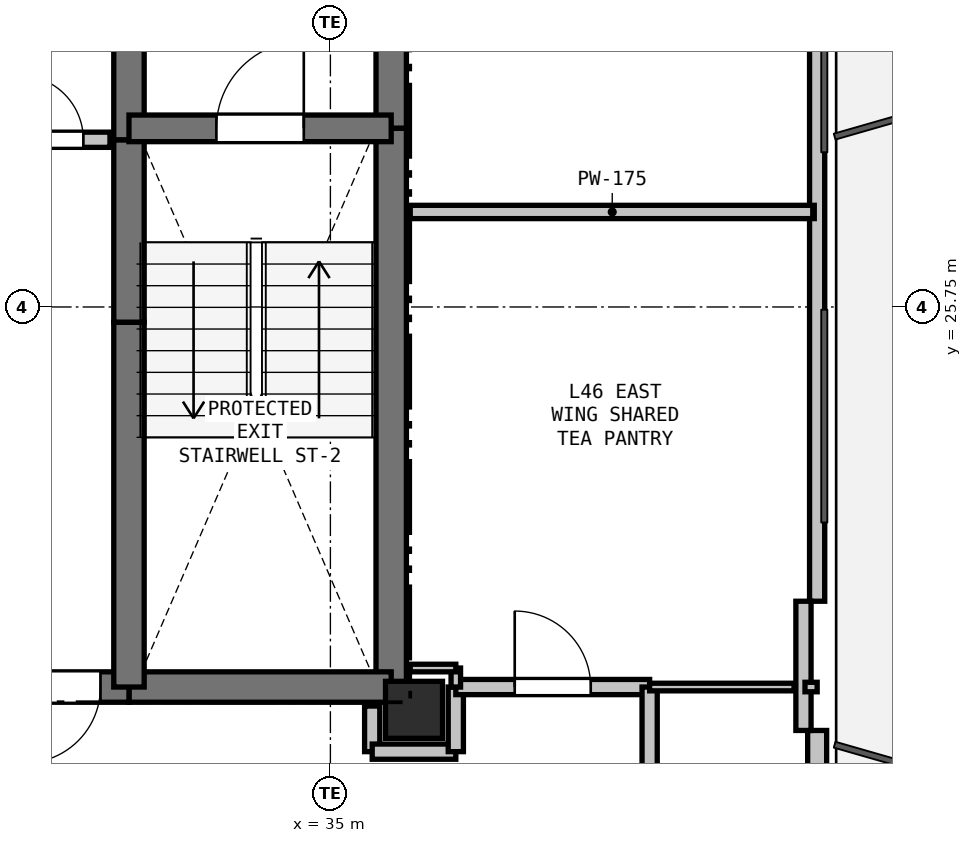
"""IFC4 building model, lengths in metres.
Left out: names, types, materials, properties, quantities, classifications, styles, units other than length and angle.
Written with IfcOpenShell. Run it as: python <this file> out.ifc"""

import sys

from ifc_helpers import new_model, si_unit, direction, frame, frame_2d, origin, origin_2d, place, context, subcontext, project, spatial, rectangle, extrude, element, fill, save


model = new_model("IFC4")
c1 = context("Model", 3, precision=1e-05, world=origin(), true_north=direction((0.0, 1.0)))
c2 = subcontext(c1, "Body", "Model", "MODEL_VIEW")
j1 = project(units=[si_unit("LENGTHUNIT", "METRE"), si_unit("PLANEANGLEUNIT", "RADIAN")], contexts=[c1])
p1 = place(None, origin())
s1 = spatial("IfcSite", under=j1, at=p1, CompositionType="ELEMENT")
p2 = place(p1, origin())
s2 = spatial("IfcBuilding", under=s1, at=p2, CompositionType="ELEMENT")
p3 = place(p2, frame((0.0, 0.0, 167.4)))
s3 = spatial("IfcBuildingStorey", under=s2, at=p3, CompositionType="ELEMENT", Elevation=167.4)
p4 = place(p3, frame((36.1, 20.45, 0.0), z_axis=(0.0, 0.0, 1.0), x_axis=(1.0, 0.0, 0.0)))
e1 = element("IfcColumn", 1, at=p4, inside=s3, PredefinedType="COLUMN", context=c2, shape_type="SweptSolid", body=[
    extrude(rectangle(XDim=0.75, YDim=0.75, at=origin_2d()), origin(), (0.0, 0.0, 1.0), 3.3),
])
p5 = place(p3, frame((41.404, 31.621, 0.0), z_axis=(0.0, 0.0, 1.0), x_axis=(0.0, -1.0, 0.0)))
e2 = element("IfcWall", 2, at=p5, inside=s3, PredefinedType="PARAPET", context=c2, shape_type="SweptSolid", body=[
    extrude(rectangle(XDim=9.742, YDim=0.2, at=frame_2d((4.871, 0.0))), origin(), (0.0, 0.0, 1.0), 0.2),
])
p6 = place(p3, frame((41.404, 20.179, 0.0), z_axis=(0.0, 0.0, 1.0), x_axis=(0.0, -1.0, 0.0)))
e3 = element("IfcWall", 3, at=p6, inside=s3, PredefinedType="SOLIDWALL", context=c2, shape_type="SweptSolid", body=[
    extrude(rectangle(XDim=10.442, YDim=0.25, at=frame_2d((5.221, 0.0))), origin(), (0.0, 0.0, 1.0), 2.64),
])
p7 = place(p6, frame((2.672, 0.0, 0.9)))
e4 = element("IfcOpeningElement", 4, at=p7, cuts=e3, PredefinedType="OPENING", context=c2, shape_type="SweptSolid", body=[
    extrude(rectangle(XDim=0.9, YDim=1.4, at=frame_2d((0.45, 0.7))), frame((0.0, 0.135, 0.0), z_axis=(0.0, -1.0, 0.0), x_axis=(1.0, 0.0, 0.0)), (0.0, 0.0, 1.0), 0.27),
])
p8 = place(p3, frame((41.224, 21.879, 0.0), z_axis=(0.0, 0.0, 1.0), x_axis=(0.0, -1.0, 0.0)))
e5 = element("IfcWall", 5, at=p8, inside=s3, PredefinedType="PARAPET", context=c2, shape_type="SweptSolid", body=[
    extrude(rectangle(XDim=1.7, YDim=0.2, at=frame_2d((0.85, 0.0))), origin(), (0.0, 0.0, 1.0), 2.64),
])
p9 = place(p3, frame((35.8, 32.75, 0.0), z_axis=(0.0, 0.0, 1.0), x_axis=(0.0, -1.0, 0.0)))
e6 = element("IfcWall", 6, at=p9, inside=s3, PredefinedType="SHEAR", context=c2, shape_type="SweptSolid", body=[
    extrude(rectangle(XDim=4.65, YDim=0.4, at=frame_2d((2.325, 0.0))), origin(), (0.0, 0.0, 1.0), 3.02),
])
p10 = place(p3, frame((35.8, 28.1, 0.0), z_axis=(0.0, 0.0, 1.0), x_axis=(0.0, -1.0, 0.0)))
e7 = element("IfcWall", 7, at=p10, inside=s3, PredefinedType="SHEAR", context=c2, shape_type="SweptSolid", body=[
    extrude(rectangle(XDim=7.35, YDim=0.4, at=frame_2d((3.675, 0.0))), origin(), (0.0, 0.0, 1.0), 3.02),
])
p11 = place(p3, frame((35.8, 20.75, 0.0), z_axis=(0.0, 0.0, 1.0), x_axis=(-1.0, 0.0, 0.0)))
e8 = element("IfcWall", 8, at=p11, inside=s3, PredefinedType="SHEAR", context=c2, shape_type="SweptSolid", body=[
    extrude(rectangle(XDim=3.45, YDim=0.4, at=frame_2d((1.725, 0.0))), origin(), (0.0, 0.0, 1.0), 3.02),
])
p12 = place(p3, frame((32.35, 20.75, 0.0), z_axis=(0.0, 0.0, 1.0), x_axis=(-1.0, 0.0, 0.0)))
e9 = element("IfcWall", 9, at=p12, inside=s3, PredefinedType="SHEAR", context=c2, shape_type="SweptSolid", body=[
    extrude(rectangle(XDim=1.75, YDim=0.4, at=frame_2d((0.875, 0.0))), origin(), (0.0, 0.0, 1.0), 3.02),
])
p13 = place(p12, frame((0.375, 0.0, 0.0)))
e10 = element("IfcOpeningElement", 10, at=p13, cuts=e9, PredefinedType="OPENING", context=c2, shape_type="SweptSolid", body=[
    extrude(rectangle(XDim=1.0, YDim=2.15, at=frame_2d((0.5, 1.075))), frame((0.0, 0.21, 0.0), z_axis=(0.0, -1.0, 0.0), x_axis=(1.0, 0.0, 0.0)), (0.0, 0.0, 1.0), 0.42),
])
p14 = place(p3, frame((32.35, 20.75, 0.0), z_axis=(0.0, 0.0, 1.0), x_axis=(0.0, 1.0, 0.0)))
e11 = element("IfcWall", 11, at=p14, inside=s3, PredefinedType="SHEAR", context=c2, shape_type="SweptSolid", body=[
    extrude(rectangle(XDim=4.8, YDim=0.4, at=frame_2d((2.4, 0.0))), origin(), (0.0, 0.0, 1.0), 3.02),
])
p15 = place(p3, frame((32.35, 25.55, 0.0), z_axis=(0.0, 0.0, 1.0), x_axis=(0.0, 1.0, 0.0)))
e12 = element("IfcWall", 12, at=p15, inside=s3, PredefinedType="SHEAR", context=c2, shape_type="SweptSolid", body=[
    extrude(rectangle(XDim=2.4, YDim=0.4, at=frame_2d((1.2, 0.0))), origin(), (0.0, 0.0, 1.0), 3.02),
])
p16 = place(p3, frame((32.35, 27.95, 0.0), z_axis=(0.0, 0.0, 1.0), x_axis=(0.0, 1.0, 0.0)))
e13 = element("IfcWall", 13, at=p16, inside=s3, PredefinedType="SHEAR", context=c2, shape_type="SweptSolid", body=[
    extrude(rectangle(XDim=2.8, YDim=0.4, at=frame_2d((1.4, 0.0))), origin(), (0.0, 0.0, 1.0), 3.02),
])
p17 = place(p3, frame((32.35, 28.1, 0.0), z_axis=(0.0, 0.0, 1.0), x_axis=(1.0, 0.0, 0.0)))
e14 = element("IfcWall", 14, at=p17, inside=s3, PredefinedType="SHEAR", context=c2, shape_type="SweptSolid", body=[
    extrude(rectangle(XDim=3.45, YDim=0.35, at=frame_2d((1.725, 0.0))), origin(), (0.0, 0.0, 1.0), 3.02),
])
p18 = place(p17, frame((1.15, 0.0, 0.0)))
e15 = element("IfcOpeningElement", 15, at=p18, cuts=e14, PredefinedType="OPENING", context=c2, shape_type="SweptSolid", body=[
    extrude(rectangle(XDim=1.15, YDim=2.15, at=frame_2d((0.575, 1.075))), frame((0.0, 0.185, 0.0), z_axis=(0.0, -1.0, 0.0), x_axis=(1.0, 0.0, 0.0)), (0.0, 0.0, 1.0), 0.37),
])
p19 = place(p3, frame((30.55, 27.95, 0.0), z_axis=(0.0, 0.0, 1.0), x_axis=(1.0, 0.0, 0.0)))
e16 = element("IfcWall", 16, at=p19, inside=s3, PredefinedType="PARTITIONING", context=c2, shape_type="SweptSolid", body=[
    extrude(rectangle(XDim=1.55, YDim=0.2, at=frame_2d((0.775, 0.0))), origin(), (0.0, 0.0, 1.0), 3.02),
])
p20 = place(p19, frame((0.35, 0.0, 0.0)))
e17 = element("IfcOpeningElement", 17, at=p20, cuts=e16, PredefinedType="OPENING", context=c2, shape_type="SweptSolid", body=[
    extrude(rectangle(XDim=0.85, YDim=2.1, at=frame_2d((0.425, 1.05))), frame((0.0, 0.11, 0.0), z_axis=(0.0, -1.0, 0.0), x_axis=(1.0, 0.0, 0.0)), (0.0, 0.0, 1.0), 0.22),
])
p21 = place(p3, frame((35.55, 20.5, 0.0), z_axis=(0.0, 0.0, 1.0), x_axis=(0.0, -1.0, 0.0)))
e18 = element("IfcWall", 18, at=p21, inside=s3, PredefinedType="PARTITIONING", context=c2, shape_type="SweptSolid", body=[
    extrude(rectangle(XDim=0.6, YDim=0.2, at=frame_2d((0.3, 0.0))), origin(), (0.0, 0.0, 1.0), 2.545),
])
p22 = place(p3, frame((35.55, 19.9, 0.0), z_axis=(0.0, 0.0, 1.0), x_axis=(1.0, 0.0, 0.0)))
e19 = element("IfcWall", 19, at=p22, inside=s3, PredefinedType="PARTITIONING", context=c2, shape_type="SweptSolid", body=[
    extrude(rectangle(XDim=1.1, YDim=0.2, at=frame_2d((0.55, 0.0))), origin(), (0.0, 0.0, 1.0), 2.469),
])
p23 = place(p3, frame((36.65, 19.9, 0.0), z_axis=(0.0, 0.0, 1.0), x_axis=(0.0, 1.0, 0.0)))
e20 = element("IfcWall", 20, at=p23, inside=s3, PredefinedType="PARTITIONING", context=c2, shape_type="SweptSolid", body=[
    extrude(rectangle(XDim=0.85, YDim=0.2, at=frame_2d((0.425, 0.0))), origin(), (0.0, 0.0, 1.0), 3.02),
])
p24 = place(p3, frame((36.65, 20.75, 0.0), z_axis=(0.0, 0.0, 1.0), x_axis=(1.0, 0.0, 0.0)))
e21 = element("IfcWall", 21, at=p24, inside=s3, PredefinedType="PARTITIONING", context=c2, shape_type="SweptSolid", body=[
    extrude(rectangle(XDim=2.55, YDim=0.2, at=frame_2d((1.275, 0.0))), origin(), (0.0, 0.0, 1.0), 3.02),
])
p25 = place(p24, frame((0.775, 0.0, 0.0)))
e22 = element("IfcOpeningElement", 22, at=p25, cuts=e21, PredefinedType="OPENING", context=c2, shape_type="SweptSolid", body=[
    extrude(rectangle(XDim=1.0, YDim=2.15, at=frame_2d((0.5, 1.075))), frame((0.0, 0.11, 0.0), z_axis=(0.0, -1.0, 0.0), x_axis=(1.0, 0.0, 0.0)), (0.0, 0.0, 1.0), 0.22),
])
p26 = place(p3, frame((39.2, 20.75, 0.0), z_axis=(0.0, 0.0, 1.0), x_axis=(0.0, -1.0, 0.0)))
e23 = element("IfcWall", 23, at=p26, inside=s3, PredefinedType="PARTITIONING", context=c2, shape_type="SweptSolid", body=[
    extrude(rectangle(XDim=2.6, YDim=0.2, at=frame_2d((1.3, 0.0))), origin(), (0.0, 0.0, 1.0), 3.02),
])
p27 = place(p3, frame((41.366, 27.0, 0.0), z_axis=(0.0, 0.0, 1.0), x_axis=(-1.0, 0.0, 0.0)))
e24 = element("IfcWall", 24, at=p27, inside=s3, PredefinedType="PLUMBINGWALL", context=c2, shape_type="SweptSolid", body=[
    extrude(rectangle(XDim=5.316, YDim=0.175, at=frame_2d((2.658, 0.0))), origin(), (0.0, 0.0, 1.0), 2.365),
])
p28 = place(p3, frame((41.404, 20.75, 0.0), z_axis=(0.0, 0.0, 1.0), x_axis=(-1.0, 0.0, 0.0)))
e25 = element("IfcWall", 25, at=p28, inside=s3, PredefinedType="PARTITIONING", context=c2, shape_type="SweptSolid", body=[
    extrude(rectangle(XDim=0.16, YDim=0.125, at=frame_2d((0.08, 0.0))), origin(), (0.0, 0.0, 1.0), 3.02),
])
p29 = place(p3, frame((41.1, 20.75, 0.0), z_axis=(0.0, 0.0, 1.0), x_axis=(-1.0, 0.0, 0.0)))
e26 = element("IfcWall", 26, at=p29, inside=s3, PredefinedType="PARTITIONING", context=c2, shape_type="SweptSolid", body=[
    extrude(rectangle(XDim=1.9, YDim=0.1, at=frame_2d((0.95, 0.0))), origin(), (0.0, 0.0, 1.0), 2.365),
])
p30 = place(p3, frame((36.65, 20.75, 0.0), z_axis=(0.0, 0.0, 1.0), x_axis=(0.0, 1.0, 0.0)))
e27 = element("IfcWall", 27, at=p30, inside=s3, PredefinedType="PARTITIONING", context=c2, shape_type="SweptSolid", body=[
    extrude(rectangle(XDim=0.25, YDim=0.125, at=frame_2d((0.125, 0.0))), origin(), (0.0, 0.0, 1.0), 3.02),
])
p31 = place(p3, frame((36.65, 21.0, 0.0), z_axis=(0.0, 0.0, 1.0), x_axis=(-1.0, 0.0, 0.0)))
e28 = element("IfcWall", 28, at=p31, inside=s3, PredefinedType="PARTITIONING", context=c2, shape_type="SweptSolid", body=[
    extrude(rectangle(XDim=0.6, YDim=0.1, at=frame_2d((0.3, 0.0))), origin(), (0.0, 0.0, 1.0), 2.545),
])
p32 = place(p13, origin())
e29 = element("IfcDoor", 29, at=p32, inside=s3, OperationType="SINGLE_SWING_RIGHT", PredefinedType="DOOR", context=c2, shape_type="SweptSolid", body=[
    extrude(rectangle(XDim=1.0, YDim=2.15, at=frame_2d((0.5, 1.075))), frame((0.0, 0.025, 0.0), z_axis=(0.0, -1.0, 0.0), x_axis=(1.0, 0.0, 0.0)), (0.0, 0.0, 1.0), 0.05),
])
fill(e10, e29)
p33 = place(p18, origin())
e30 = element("IfcDoor", 30, at=p33, inside=s3, OperationType="SINGLE_SWING_RIGHT", PredefinedType="DOOR", context=c2, shape_type="SweptSolid", body=[
    extrude(rectangle(XDim=1.15, YDim=2.15, at=frame_2d((0.575, 1.075))), frame((0.0, 0.025, 0.0), z_axis=(0.0, -1.0, 0.0), x_axis=(1.0, 0.0, 0.0)), (0.0, 0.0, 1.0), 0.05),
])
fill(e15, e30)
p34 = place(p20, origin())
e31 = element("IfcDoor", 31, at=p34, inside=s3, OperationType="SINGLE_SWING_LEFT", PredefinedType="DOOR", context=c2, shape_type="SweptSolid", body=[
    extrude(rectangle(XDim=0.85, YDim=2.1, at=frame_2d((0.425, 1.05))), frame((0.0, 0.025, 0.0), z_axis=(0.0, -1.0, 0.0), x_axis=(1.0, 0.0, 0.0)), (0.0, 0.0, 1.0), 0.05),
])
fill(e17, e31)
p35 = place(p25, origin())
e32 = element("IfcDoor", 32, at=p35, inside=s3, OperationType="SINGLE_SWING_LEFT", PredefinedType="DOOR", context=c2, shape_type="SweptSolid", body=[
    extrude(rectangle(XDim=1.0, YDim=2.15, at=frame_2d((0.5, 1.075))), frame((0.0, 0.025, 0.0), z_axis=(0.0, -1.0, 0.0), x_axis=(1.0, 0.0, 0.0)), (0.0, 0.0, 1.0), 0.05),
])
fill(e22, e32)
save(model, sys.argv[1])
